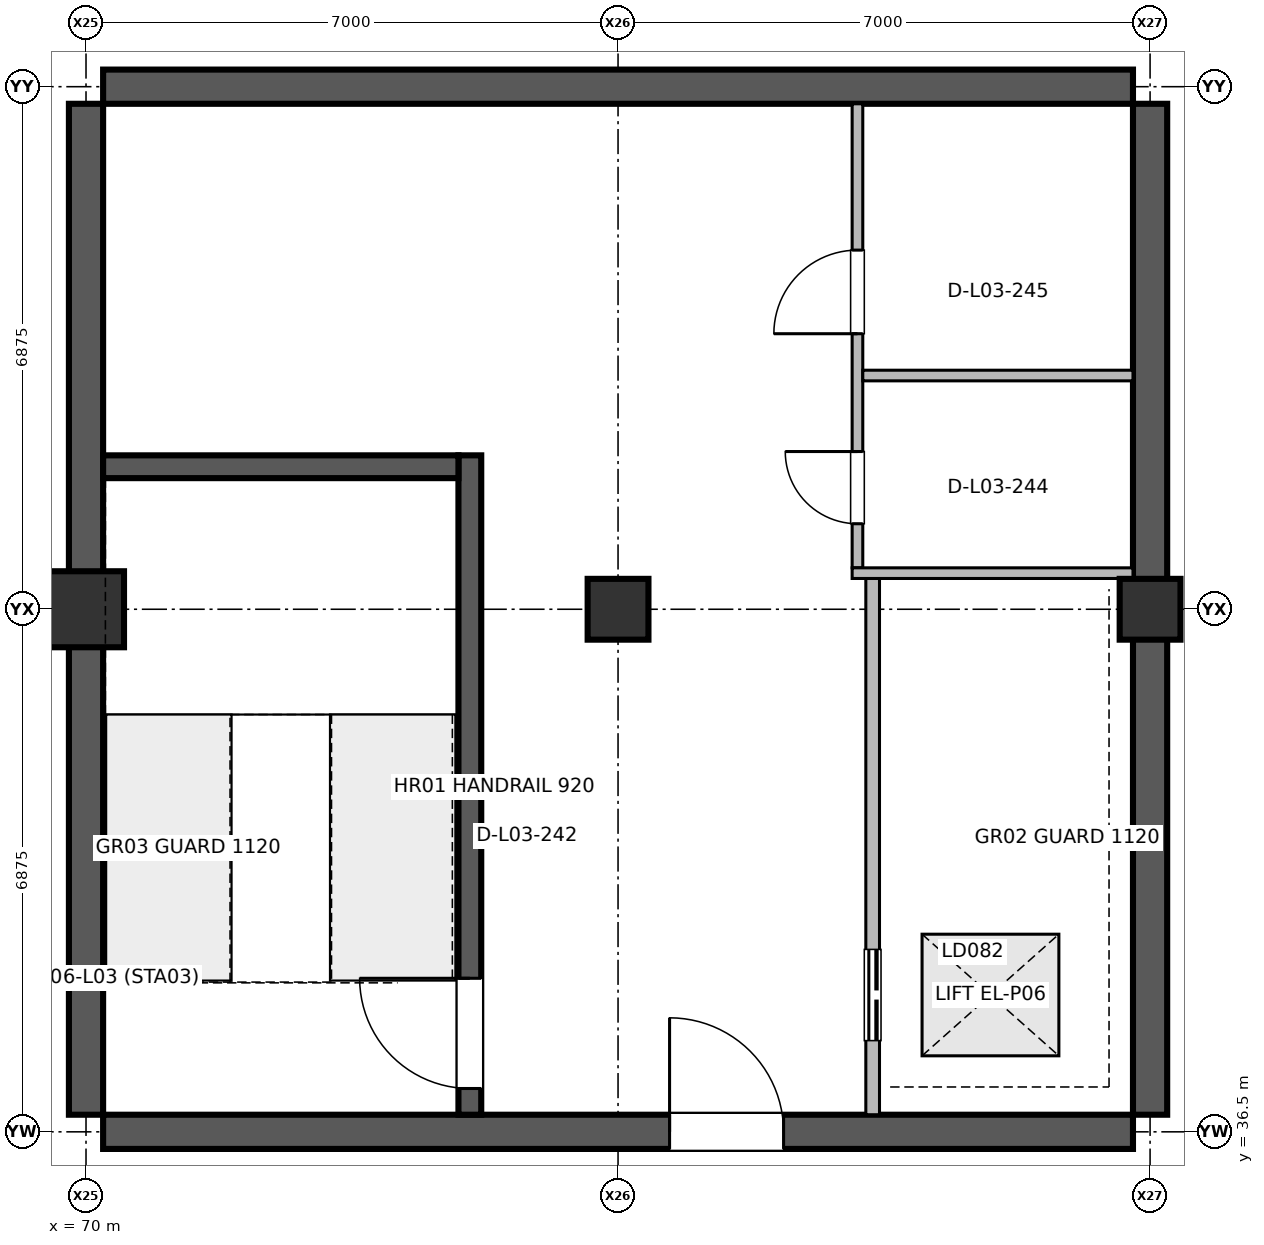
"""IFC4 building model, lengths in metres.
Left out: names, types, materials, properties, quantities, classifications, styles, units other than length and angle.
Written with IfcOpenShell. Run it as: python <this file> out.ifc"""

import sys

from ifc_helpers import new_model, si_unit, direction, frame, frame_2d, origin, origin_2d, place, context, subcontext, project, spatial, rectangle, extrude, element, fill, save


model = new_model("IFC4")
c1 = context("Model", 3, precision=1e-05, world=origin(), true_north=direction((0.0, 1.0)))
c2 = subcontext(c1, "Body", "Model", "MODEL_VIEW")
j1 = project(units=[si_unit("LENGTHUNIT", "METRE"), si_unit("PLANEANGLEUNIT", "RADIAN")], contexts=[c1])
p1 = place(None, origin())
s1 = spatial("IfcSite", under=j1, at=p1, CompositionType="ELEMENT")
p2 = place(p1, origin())
s2 = spatial("IfcBuilding", under=s1, at=p2, CompositionType="ELEMENT")
p3 = place(p2, frame((0.0, 0.0, 11.4)))
s3 = spatial("IfcBuildingStorey", under=s2, at=p3, CompositionType="ELEMENT", Elevation=11.4)
p4 = place(p3, frame((70.0, 43.375, 0.0), z_axis=(0.0, 0.0, 1.0), x_axis=(1.0, 0.0, 0.0)))
e1 = element("IfcColumn", 1, at=p4, inside=s3, PredefinedType="COLUMN", context=c2, shape_type="SweptSolid", body=[
    extrude(rectangle(XDim=1.0, YDim=1.0, at=origin_2d()), origin(), (0.0, 0.0, 1.0), 4.798),
])
for number, where, z_axis, x_axis in (
    (2, (77.0, 43.375, 0.0), (0.0, 0.0, 1.0), (1.0, 0.0, 0.0)),
    (3, (84.0, 43.375, 0.0), (0.0, 0.0, 1.0), (1.0, 0.0, 0.0)),
):
    element("IfcColumn", number, at=place(p3, frame(where, z_axis=z_axis, x_axis=x_axis)), inside=s3, PredefinedType="COLUMN", context=c2, shape_type="SweptSolid", body=[
        extrude(rectangle(XDim=0.8, YDim=0.8, at=origin_2d()), origin(), (0.0, 0.0, 1.0), 4.798),
    ])
for number, where, z_axis, x_axis in (
    (4, (70.0, 36.725, 0.0), (0.0, 0.0, 1.0), (0.0, 1.0, 0.0)),
    (5, (84.0, 36.725, 0.0), (0.0, 0.0, 1.0), (0.0, 1.0, 0.0)),
):
    element("IfcWall", number, at=place(p3, frame(where, z_axis=z_axis, x_axis=x_axis)), inside=s3, PredefinedType="SHEAR", context=c2, shape_type="SweptSolid", body=[
        extrude(rectangle(XDim=13.3, YDim=0.45, at=frame_2d((6.65, 0.0))), origin(), (0.0, 0.0, 1.0), 4.58),
    ])
p5 = place(p3, frame((70.225, 36.5, 0.0), z_axis=(0.0, 0.0, 1.0), x_axis=(1.0, 0.0, 0.0)))
e6 = element("IfcWall", 6, at=p5, inside=s3, PredefinedType="SHEAR", context=c2, shape_type="SweptSolid", body=[
    extrude(rectangle(XDim=13.55, YDim=0.45, at=frame_2d((6.775, 0.0))), origin(), (0.0, 0.0, 1.0), 4.58),
])
p6 = place(p5, frame((7.453, 0.0, 0.0)))
e7 = element("IfcOpeningElement", 7, at=p6, cuts=e6, PredefinedType="OPENING", context=c2, shape_type="SweptSolid", body=[
    extrude(rectangle(XDim=1.5, YDim=2.2, at=frame_2d((0.75, 1.1))), frame((0.0, 0.235, 0.0), z_axis=(0.0, -1.0, 0.0), x_axis=(1.0, 0.0, 0.0)), (0.0, 0.0, 1.0), 0.47),
])
p7 = place(p3, frame((70.225, 50.25, 0.0), z_axis=(0.0, 0.0, 1.0), x_axis=(1.0, 0.0, 0.0)))
e8 = element("IfcWall", 8, at=p7, inside=s3, PredefinedType="SHEAR", context=c2, shape_type="SweptSolid", body=[
    extrude(rectangle(XDim=13.55, YDim=0.45, at=frame_2d((6.775, 0.0))), origin(), (0.0, 0.0, 1.0), 4.58),
])
p8 = place(p3, frame((75.05, 36.725, 0.0), z_axis=(0.0, 0.0, 1.0), x_axis=(0.0, 1.0, 0.0)))
e9 = element("IfcWall", 9, at=p8, inside=s3, PredefinedType="SHEAR", context=c2, shape_type="SweptSolid", body=[
    extrude(rectangle(XDim=8.675, YDim=0.3, at=frame_2d((4.337, 0.0))), origin(), (0.0, 0.0, 1.0), 4.58),
])
p9 = place(p8, frame((0.345, 0.0, 0.0)))
e10 = element("IfcOpeningElement", 10, at=p9, cuts=e9, PredefinedType="OPENING", context=c2, shape_type="SweptSolid", body=[
    extrude(rectangle(XDim=1.45, YDim=2.2, at=frame_2d((0.725, 1.1))), frame((0.0, 0.16, 0.0), z_axis=(0.0, -1.0, 0.0), x_axis=(1.0, 0.0, 0.0)), (0.0, 0.0, 1.0), 0.32),
])
p10 = place(p3, frame((80.35, 36.725, 0.0), z_axis=(0.0, 0.0, 1.0), x_axis=(0.0, 1.0, 0.0)))
e11 = element("IfcWall", 11, at=p10, inside=s3, PredefinedType="PARTITIONING", context=c2, shape_type="SweptSolid", body=[
    extrude(rectangle(XDim=7.055, YDim=0.18, at=frame_2d((3.527, 0.0))), origin(), (0.0, 0.0, 1.0), 3.82),
])
p11 = place(p10, frame((0.975, 0.0, 0.0)))
e12 = element("IfcOpeningElement", 12, at=p11, cuts=e11, PredefinedType="OPENING", context=c2, shape_type="SweptSolid", body=[
    extrude(rectangle(XDim=1.2, YDim=2.25, at=frame_2d((0.6, 1.125))), frame((0.0, 0.1, 0.0), z_axis=(0.0, -1.0, 0.0), x_axis=(1.0, 0.0, 0.0)), (0.0, 0.0, 1.0), 0.2),
])
p12 = place(p3, frame((80.15, 43.92, 0.0), z_axis=(0.0, 0.0, 1.0), x_axis=(0.0, 1.0, 0.0)))
e13 = element("IfcWall", 13, at=p12, inside=s3, PredefinedType="PARTITIONING", context=c2, shape_type="SweptSolid", body=[
    extrude(rectangle(XDim=6.105, YDim=0.14, at=frame_2d((3.052, 0.0))), origin(), (0.0, 0.0, 1.0), 3.82),
])
p13 = place(p12, frame((0.58, 0.0, 0.0)))
e14 = element("IfcOpeningElement", 14, at=p13, cuts=e13, PredefinedType="OPENING", context=c2, shape_type="SweptSolid", body=[
    extrude(rectangle(XDim=0.95, YDim=2.15, at=frame_2d((0.475, 1.075))), frame((0.0, 0.08, 0.0), z_axis=(0.0, -1.0, 0.0), x_axis=(1.0, 0.0, 0.0)), (0.0, 0.0, 1.0), 0.16),
])
p14 = place(p12, frame((3.08, 0.0, 0.0)))
e15 = element("IfcOpeningElement", 15, at=p14, cuts=e13, PredefinedType="OPENING", context=c2, shape_type="SweptSolid", body=[
    extrude(rectangle(XDim=1.1, YDim=2.15, at=frame_2d((0.55, 1.075))), frame((0.0, 0.08, 0.0), z_axis=(0.0, -1.0, 0.0), x_axis=(1.0, 0.0, 0.0)), (0.0, 0.0, 1.0), 0.16),
])
p15 = place(p3, frame((80.08, 43.85, 0.0), z_axis=(0.0, 0.0, 1.0), x_axis=(1.0, 0.0, 0.0)))
e16 = element("IfcWall", 16, at=p15, inside=s3, PredefinedType="PARTITIONING", context=c2, shape_type="SweptSolid", body=[
    extrude(rectangle(XDim=3.695, YDim=0.14, at=frame_2d((1.847, 0.0))), origin(), (0.0, 0.0, 1.0), 3.82),
])
p16 = place(p3, frame((80.22, 46.45, 0.0), z_axis=(0.0, 0.0, 1.0), x_axis=(1.0, 0.0, 0.0)))
e17 = element("IfcWall", 17, at=p16, inside=s3, PredefinedType="PARTITIONING", context=c2, shape_type="SweptSolid", body=[
    extrude(rectangle(XDim=3.555, YDim=0.14, at=frame_2d((1.777, 0.0))), origin(), (0.0, 0.0, 1.0), 3.82),
])
p17 = place(p3, frame((70.225, 45.25, 0.0), z_axis=(0.0, 0.0, 1.0), x_axis=(1.0, 0.0, 0.0)))
e18 = element("IfcWall", 18, at=p17, inside=s3, PredefinedType="SHEAR", context=c2, shape_type="SweptSolid", body=[
    extrude(rectangle(XDim=4.675, YDim=0.3, at=frame_2d((2.337, 0.0))), origin(), (0.0, 0.0, 1.0), 4.58),
])
p18 = place(p6, origin())
e19 = element("IfcDoor", 19, at=p18, inside=s3, OperationType="SINGLE_SWING_LEFT", PredefinedType="DOOR", context=c2, shape_type="SweptSolid", body=[
    extrude(rectangle(XDim=1.5, YDim=2.2, at=frame_2d((0.75, 1.1))), frame((0.0, 0.025, 0.0), z_axis=(0.0, -1.0, 0.0), x_axis=(1.0, 0.0, 0.0)), (0.0, 0.0, 1.0), 0.05),
])
fill(e7, e19)
p19 = place(p9, origin())
e20 = element("IfcDoor", 20, at=p19, inside=s3, OperationType="SINGLE_SWING_RIGHT", PredefinedType="DOOR", context=c2, shape_type="SweptSolid", body=[
    extrude(rectangle(XDim=1.45, YDim=2.2, at=frame_2d((0.725, 1.1))), frame((0.0, 0.025, 0.0), z_axis=(0.0, -1.0, 0.0), x_axis=(1.0, 0.0, 0.0)), (0.0, 0.0, 1.0), 0.05),
])
fill(e10, e20)
p20 = place(p11, origin())
e21 = element("IfcDoor", 21, at=p20, inside=s3, OperationType="DOUBLE_DOOR_SLIDING", PredefinedType="DOOR", context=c2, shape_type="SweptSolid", body=[
    extrude(rectangle(XDim=1.2, YDim=2.25, at=frame_2d((0.6, 1.125))), frame((0.0, 0.025, 0.0), z_axis=(0.0, -1.0, 0.0), x_axis=(1.0, 0.0, 0.0)), (0.0, 0.0, 1.0), 0.05),
])
fill(e12, e21)
p21 = place(p13, origin())
e22 = element("IfcDoor", 22, at=p21, inside=s3, OperationType="SINGLE_SWING_RIGHT", PredefinedType="DOOR", context=c2, shape_type="SweptSolid", body=[
    extrude(rectangle(XDim=0.95, YDim=2.15, at=frame_2d((0.475, 1.075))), frame((0.0, 0.025, 0.0), z_axis=(0.0, -1.0, 0.0), x_axis=(1.0, 0.0, 0.0)), (0.0, 0.0, 1.0), 0.05),
])
fill(e14, e22)
p22 = place(p14, origin())
e23 = element("IfcDoor", 23, at=p22, inside=s3, OperationType="SINGLE_SWING_LEFT", PredefinedType="DOOR", context=c2, shape_type="SweptSolid", body=[
    extrude(rectangle(XDim=1.1, YDim=2.15, at=frame_2d((0.55, 1.075))), frame((0.0, 0.025, 0.0), z_axis=(0.0, -1.0, 0.0), x_axis=(1.0, 0.0, 0.0)), (0.0, 0.0, 1.0), 0.05),
])
fill(e15, e23)
save(model, sys.argv[1])
